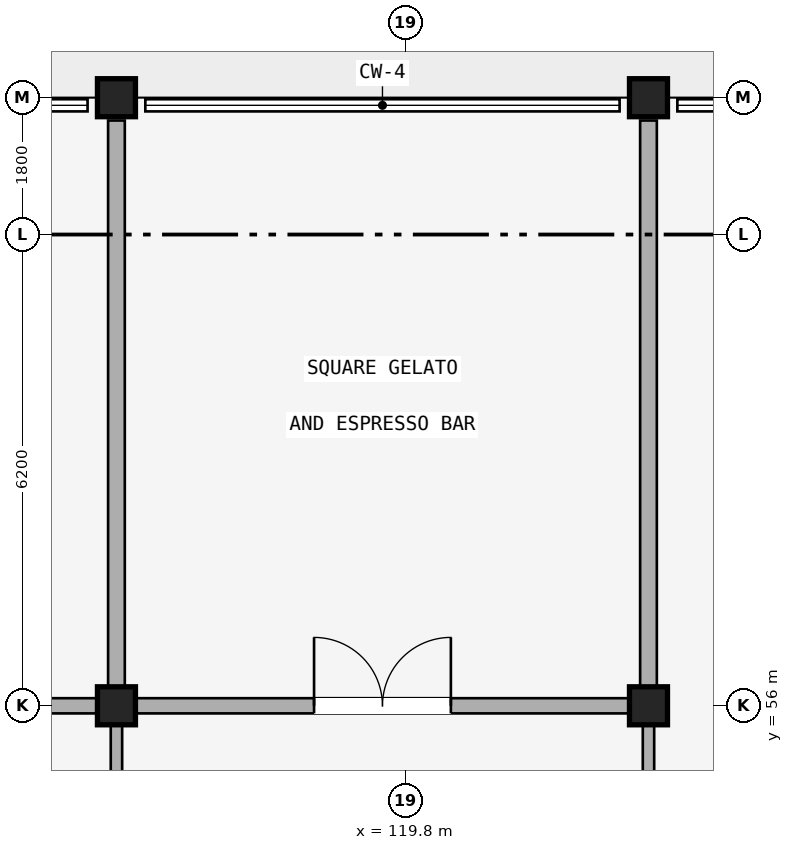
"""IFC4 building model, lengths in metres.
Left out: names, types, materials, properties, quantities, classifications, styles, units other than length and angle.
Written with IfcOpenShell. Run it as: python <this file> out.ifc"""

import sys

from ifc_helpers import new_model, si_unit, direction, frame, frame_2d, origin, origin_2d, place, context, subcontext, project, spatial, rectangle, extrude, element, fill, save


model = new_model("IFC4")
c1 = context("Model", 3, precision=1e-05, world=origin(), true_north=direction((0.0, 1.0)))
c2 = subcontext(c1, "Body", "Model", "MODEL_VIEW")
j1 = project(units=[si_unit("LENGTHUNIT", "METRE"), si_unit("PLANEANGLEUNIT", "RADIAN")], contexts=[c1])
p1 = place(None, origin())
s1 = spatial("IfcSite", under=j1, at=p1, CompositionType="ELEMENT")
p2 = place(p1, origin())
s2 = spatial("IfcBuilding", under=s1, at=p2, CompositionType="ELEMENT")
p3 = place(p2, origin())
s3 = spatial("IfcBuildingStorey", under=s2, at=p3, CompositionType="ELEMENT", Elevation=0.0)
for number, where, z_axis, x_axis in (
    (1, (116.0, 56.0, 0.0), (0.0, 0.0, 1.0), (1.0, 0.0, 0.0)),
    (2, (116.0, 64.0, 0.0), (0.0, 0.0, 1.0), (1.0, 0.0, 0.0)),
    (3, (123.0, 56.0, 0.0), (0.0, 0.0, 1.0), (1.0, 0.0, 0.0)),
    (4, (123.0, 64.0, 0.0), (0.0, 0.0, 1.0), (1.0, 0.0, 0.0)),
):
    element("IfcColumn", number, at=place(p3, frame(where, z_axis=z_axis, x_axis=x_axis)), inside=s3, PredefinedType="COLUMN", context=c2, shape_type="SweptSolid", body=[
        extrude(rectangle(XDim=0.5, YDim=0.5, at=origin_2d()), origin(), (0.0, 0.0, 1.0), 4.28),
    ])
p4 = place(p3, frame((109.15, 56.0, 0.0), z_axis=(0.0, 0.0, 1.0), x_axis=(1.0, 0.0, 0.0)))
e5 = element("IfcWall", 5, at=p4, inside=s3, PredefinedType="STANDARD", context=c2, shape_type="SweptSolid", body=[
    extrude(rectangle(XDim=6.7, YDim=0.2, at=frame_2d((3.35, 0.0))), origin(), (0.0, 0.0, 1.0), 3.672),
])
p5 = place(p4, frame((2.45, 0.0, 0.0)))
e6 = element("IfcOpeningElement", 6, at=p5, cuts=e5, PredefinedType="OPENING", context=c2, shape_type="SweptSolid", body=[
    extrude(rectangle(XDim=1.8, YDim=2.2, at=frame_2d((0.9, 1.1))), frame((0.0, 0.11, 0.0), z_axis=(0.0, -1.0, 0.0), x_axis=(1.0, 0.0, 0.0)), (0.0, 0.0, 1.0), 0.22),
])
p6 = place(p3, frame((116.15, 56.0, 0.0), z_axis=(0.0, 0.0, 1.0), x_axis=(1.0, 0.0, 0.0)))
e7 = element("IfcWall", 7, at=p6, inside=s3, PredefinedType="STANDARD", context=c2, shape_type="SweptSolid", body=[
    extrude(rectangle(XDim=6.7, YDim=0.2, at=frame_2d((3.35, 0.0))), origin(), (0.0, 0.0, 1.0), 3.672),
])
p7 = place(p6, frame((2.45, 0.0, 0.0)))
e8 = element("IfcOpeningElement", 8, at=p7, cuts=e7, PredefinedType="OPENING", context=c2, shape_type="SweptSolid", body=[
    extrude(rectangle(XDim=1.8, YDim=2.2, at=frame_2d((0.9, 1.1))), frame((0.0, 0.11, 0.0), z_axis=(0.0, -1.0, 0.0), x_axis=(1.0, 0.0, 0.0)), (0.0, 0.0, 1.0), 0.22),
])
p8 = place(p3, frame((116.0, 48.1, 0.0), z_axis=(0.0, 0.0, 1.0), x_axis=(0.0, 1.0, 0.0)))
e9 = element("IfcWall", 9, at=p8, inside=s3, PredefinedType="PARTITIONING", context=c2, shape_type="SweptSolid", body=[
    extrude(rectangle(XDim=7.8, YDim=0.15, at=frame_2d((3.9, 0.0))), origin(), (0.0, 0.0, 1.0), 3.672),
])
p9 = place(p8, frame((3.0, 0.0, 0.0)))
e10 = element("IfcOpeningElement", 10, at=p9, cuts=e9, PredefinedType="OPENING", context=c2, shape_type="SweptSolid", body=[
    extrude(rectangle(XDim=1.8, YDim=2.2, at=frame_2d((0.9, 1.1))), frame((0.0, 0.085, 0.0), z_axis=(0.0, -1.0, 0.0), x_axis=(1.0, 0.0, 0.0)), (0.0, 0.0, 1.0), 0.17),
])
p10 = place(p3, frame((116.0, 56.1, 0.0), z_axis=(0.0, 0.0, 1.0), x_axis=(0.0, 1.0, 0.0)))
e11 = element("IfcWall", 11, at=p10, inside=s3, PredefinedType="STANDARD", context=c2, shape_type="SweptSolid", body=[
    extrude(rectangle(XDim=7.6, YDim=0.22, at=frame_2d((3.8, 0.0))), origin(), (0.0, 0.0, 1.0), 3.672),
])
p11 = place(p3, frame((123.0, 48.1, 0.0), z_axis=(0.0, 0.0, 1.0), x_axis=(0.0, 1.0, 0.0)))
e12 = element("IfcWall", 12, at=p11, inside=s3, PredefinedType="PARTITIONING", context=c2, shape_type="SweptSolid", body=[
    extrude(rectangle(XDim=7.8, YDim=0.15, at=frame_2d((3.9, 0.0))), origin(), (0.0, 0.0, 1.0), 3.672),
])
p12 = place(p11, frame((3.0, 0.0, 0.0)))
e13 = element("IfcOpeningElement", 13, at=p12, cuts=e12, PredefinedType="OPENING", context=c2, shape_type="SweptSolid", body=[
    extrude(rectangle(XDim=1.8, YDim=2.2, at=frame_2d((0.9, 1.1))), frame((0.0, 0.085, 0.0), z_axis=(0.0, -1.0, 0.0), x_axis=(1.0, 0.0, 0.0)), (0.0, 0.0, 1.0), 0.17),
])
p13 = place(p3, frame((123.0, 56.1, 0.0), z_axis=(0.0, 0.0, 1.0), x_axis=(0.0, 1.0, 0.0)))
e14 = element("IfcWall", 14, at=p13, inside=s3, PredefinedType="STANDARD", context=c2, shape_type="SweptSolid", body=[
    extrude(rectangle(XDim=7.6, YDim=0.22, at=frame_2d((3.8, 0.0))), origin(), (0.0, 0.0, 1.0), 3.672),
])
p14 = place(p7, origin())
e15 = element("IfcDoor", 15, at=p14, inside=s3, OperationType="DOUBLE_DOOR_SINGLE_SWING", PredefinedType="DOOR", context=c2, shape_type="SweptSolid", body=[
    extrude(rectangle(XDim=1.8, YDim=2.2, at=frame_2d((0.9, 1.1))), frame((0.0, 0.025, 0.0), z_axis=(0.0, -1.0, 0.0), x_axis=(1.0, 0.0, 0.0)), (0.0, 0.0, 1.0), 0.05),
])
fill(e8, e15)
save(model, sys.argv[1])
